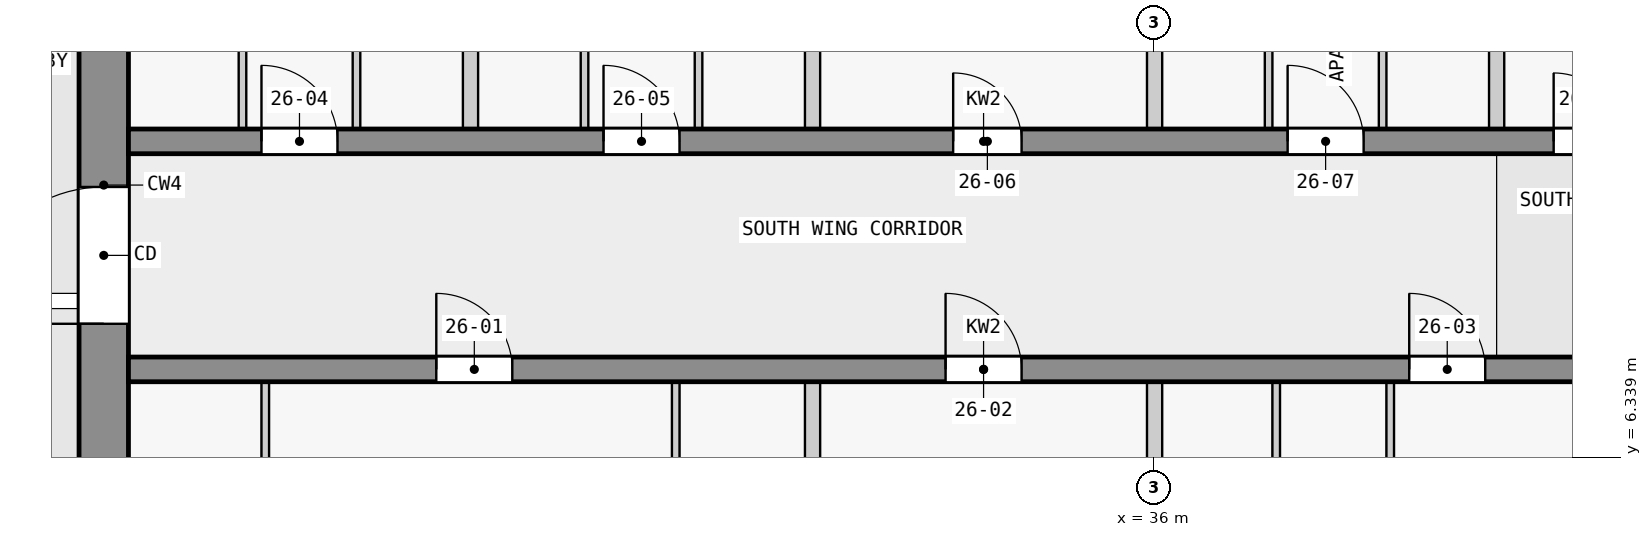
"""IFC4 building model, lengths in metres.
Left out: names, types, materials, properties, quantities, classifications, styles, units other than length and angle.
Written with IfcOpenShell. Run it as: python <this file> out.ifc"""

import sys

from ifc_helpers import new_model, si_unit, direction, frame, frame_2d, origin, place, context, subcontext, project, spatial, rectangle, extrude, element, fill, save


model = new_model("IFC4")
c1 = context("Model", 3, precision=1e-05, world=origin(), true_north=direction((0.0, 1.0)))
c2 = subcontext(c1, "Body", "Model", "MODEL_VIEW")
j1 = project(units=[si_unit("LENGTHUNIT", "METRE"), si_unit("PLANEANGLEUNIT", "RADIAN")], contexts=[c1])
p1 = place(None, origin())
s1 = spatial("IfcSite", under=j1, at=p1, CompositionType="ELEMENT")
p2 = place(p1, origin())
s2 = spatial("IfcBuilding", under=s1, at=p2, CompositionType="ELEMENT")
p3 = place(p2, frame((0.0, 0.0, 102.8)))
s3 = spatial("IfcBuildingStorey", under=s2, at=p3, CompositionType="ELEMENT", Elevation=102.8)
p4 = place(p3, frame((22.175, 2.5, 0.0), z_axis=(0.0, 0.0, 1.0), x_axis=(0.0, 1.0, 0.0)))
e1 = element("IfcWall", 1, at=p4, inside=s3, PredefinedType="SHEAR", context=c2, shape_type="SweptSolid", body=[
    extrude(rectangle(XDim=14.85, YDim=0.65, at=frame_2d((7.425, 0.0))), origin(), (0.0, 0.0, 1.0), 3.25),
])
p5 = place(p4, frame((5.6, 0.0, 0.0)))
e2 = element("IfcOpeningElement", 2, at=p5, cuts=e1, PredefinedType="OPENING", context=c2, shape_type="SweptSolid", body=[
    extrude(rectangle(XDim=1.8, YDim=2.1, at=frame_2d((0.9, 1.05))), frame((0.0, 0.335, 0.0), z_axis=(0.0, -1.0, 0.0), x_axis=(1.0, 0.0, 0.0)), (0.0, 0.0, 1.0), 0.67),
])
p6 = place(p3, frame((22.5, 7.5, 0.0), z_axis=(0.0, 0.0, 1.0), x_axis=(1.0, 0.0, 0.0)))
e3 = element("IfcWall", 3, at=p6, inside=s3, PredefinedType="SHEAR", context=c2, shape_type="SweptSolid", body=[
    extrude(rectangle(XDim=22.5, YDim=0.325, at=frame_2d((11.25, 0.0))), origin(), (0.0, 0.0, 1.0), 3.25),
])
p7 = place(p6, frame((4.05, 0.0, 0.0)))
e4 = element("IfcOpeningElement", 4, at=p7, cuts=e3, PredefinedType="OPENING", context=c2, shape_type="SweptSolid", body=[
    extrude(rectangle(XDim=1.0, YDim=2.1, at=frame_2d((0.5, 1.05))), frame((0.0, 0.172, 0.0), z_axis=(0.0, -1.0, 0.0), x_axis=(1.0, 0.0, 0.0)), (0.0, 0.0, 1.0), 0.345),
])
p8 = place(p6, frame((10.75, 0.0, 0.0)))
e5 = element("IfcOpeningElement", 5, at=p8, cuts=e3, PredefinedType="OPENING", context=c2, shape_type="SweptSolid", body=[
    extrude(rectangle(XDim=1.0, YDim=2.1, at=frame_2d((0.5, 1.05))), frame((0.0, 0.172, 0.0), z_axis=(0.0, -1.0, 0.0), x_axis=(1.0, 0.0, 0.0)), (0.0, 0.0, 1.0), 0.345),
])
p9 = place(p6, frame((16.85, 0.0, 0.0)))
e6 = element("IfcOpeningElement", 6, at=p9, cuts=e3, PredefinedType="OPENING", context=c2, shape_type="SweptSolid", body=[
    extrude(rectangle(XDim=1.0, YDim=2.1, at=frame_2d((0.5, 1.05))), frame((0.0, 0.172, 0.0), z_axis=(0.0, -1.0, 0.0), x_axis=(1.0, 0.0, 0.0)), (0.0, 0.0, 1.0), 0.345),
])
p10 = place(p3, frame((22.5, 10.5, 0.0), z_axis=(0.0, 0.0, 1.0), x_axis=(1.0, 0.0, 0.0)))
e7 = element("IfcWall", 7, at=p10, inside=s3, PredefinedType="SHEAR", context=c2, shape_type="SweptSolid", body=[
    extrude(rectangle(XDim=22.5, YDim=0.325, at=frame_2d((11.25, 0.0))), origin(), (0.0, 0.0, 1.0), 3.25),
])
p11 = place(p10, frame((1.75, 0.0, 0.0)))
e8 = element("IfcOpeningElement", 8, at=p11, cuts=e7, PredefinedType="OPENING", context=c2, shape_type="SweptSolid", body=[
    extrude(rectangle(XDim=1.0, YDim=2.1, at=frame_2d((0.5, 1.05))), frame((0.0, 0.172, 0.0), z_axis=(0.0, -1.0, 0.0), x_axis=(1.0, 0.0, 0.0)), (0.0, 0.0, 1.0), 0.345),
])
p12 = place(p10, frame((6.25, 0.0, 0.0)))
e9 = element("IfcOpeningElement", 9, at=p12, cuts=e7, PredefinedType="OPENING", context=c2, shape_type="SweptSolid", body=[
    extrude(rectangle(XDim=1.0, YDim=2.1, at=frame_2d((0.5, 1.05))), frame((0.0, 0.172, 0.0), z_axis=(0.0, -1.0, 0.0), x_axis=(1.0, 0.0, 0.0)), (0.0, 0.0, 1.0), 0.345),
])
p13 = place(p10, frame((10.85, 0.0, 0.0)))
e10 = element("IfcOpeningElement", 10, at=p13, cuts=e7, PredefinedType="OPENING", context=c2, shape_type="SweptSolid", body=[
    extrude(rectangle(XDim=0.9, YDim=2.1, at=frame_2d((0.45, 1.05))), frame((0.0, 0.172, 0.0), z_axis=(0.0, -1.0, 0.0), x_axis=(1.0, 0.0, 0.0)), (0.0, 0.0, 1.0), 0.345),
])
p14 = place(p10, frame((15.25, 0.0, 0.0)))
e11 = element("IfcOpeningElement", 11, at=p14, cuts=e7, PredefinedType="OPENING", context=c2, shape_type="SweptSolid", body=[
    extrude(rectangle(XDim=1.0, YDim=2.1, at=frame_2d((0.5, 1.05))), frame((0.0, 0.172, 0.0), z_axis=(0.0, -1.0, 0.0), x_axis=(1.0, 0.0, 0.0)), (0.0, 0.0, 1.0), 0.345),
])
p15 = place(p10, frame((18.75, 0.0, 0.0)))
e12 = element("IfcOpeningElement", 12, at=p15, cuts=e7, PredefinedType="OPENING", context=c2, shape_type="SweptSolid", body=[
    extrude(rectangle(XDim=0.9, YDim=2.1, at=frame_2d((0.45, 1.05))), frame((0.0, 0.172, 0.0), z_axis=(0.0, -1.0, 0.0), x_axis=(1.0, 0.0, 0.0)), (0.0, 0.0, 1.0), 0.345),
])
p16 = place(p10, frame((20.95, 0.0, 0.0)))
e13 = element("IfcOpeningElement", 13, at=p16, cuts=e7, PredefinedType="OPENING", context=c2, shape_type="SweptSolid", body=[
    extrude(rectangle(XDim=1.0, YDim=2.1, at=frame_2d((0.5, 1.05))), frame((0.0, 0.172, 0.0), z_axis=(0.0, -1.0, 0.0), x_axis=(1.0, 0.0, 0.0)), (0.0, 0.0, 1.0), 0.345),
])
p17 = place(p3, frame((24.0, 10.663, 0.0), z_axis=(0.0, 0.0, 1.0), x_axis=(0.0, 1.0, 0.0)))
e14 = element("IfcWall", 14, at=p17, inside=s3, PredefinedType="PARTITIONING", context=c2, shape_type="SweptSolid", body=[
    extrude(rectangle(XDim=3.4, YDim=0.1, at=frame_2d((1.7, 0.0))), origin(), (0.0, 0.0, 1.0), 3.25),
])
p18 = place(p17, frame((1.25, 0.0, 0.0)))
e15 = element("IfcOpeningElement", 15, at=p18, cuts=e14, PredefinedType="OPENING", context=c2, shape_type="SweptSolid", body=[
    extrude(rectangle(XDim=0.9, YDim=2.1, at=frame_2d((0.45, 1.05))), frame((0.0, 0.06, 0.0), z_axis=(0.0, -1.0, 0.0), x_axis=(1.0, 0.0, 0.0)), (0.0, 0.0, 1.0), 0.12),
])
p19 = place(p3, frame((24.3, 3.938, 0.0), z_axis=(0.0, 0.0, 1.0), x_axis=(0.0, 1.0, 0.0)))
e16 = element("IfcWall", 16, at=p19, inside=s3, PredefinedType="PARTITIONING", context=c2, shape_type="SweptSolid", body=[
    extrude(rectangle(XDim=3.4, YDim=0.1, at=frame_2d((1.7, 0.0))), origin(), (0.0, 0.0, 1.0), 3.25),
])
p20 = place(p19, frame((1.25, 0.0, 0.0)))
e17 = element("IfcOpeningElement", 17, at=p20, cuts=e16, PredefinedType="OPENING", context=c2, shape_type="SweptSolid", body=[
    extrude(rectangle(XDim=0.9, YDim=2.1, at=frame_2d((0.45, 1.05))), frame((0.0, 0.06, 0.0), z_axis=(0.0, -1.0, 0.0), x_axis=(1.0, 0.0, 0.0)), (0.0, 0.0, 1.0), 0.12),
])
p21 = place(p3, frame((25.5, 14.062, 0.0), z_axis=(0.0, 0.0, 1.0), x_axis=(0.0, -1.0, 0.0)))
e18 = element("IfcWall", 18, at=p21, inside=s3, PredefinedType="PARTITIONING", context=c2, shape_type="SweptSolid", body=[
    extrude(rectangle(XDim=3.4, YDim=0.1, at=frame_2d((1.7, 0.0))), origin(), (0.0, 0.0, 1.0), 3.25),
])
p22 = place(p21, frame((1.25, 0.0, 0.0)))
e19 = element("IfcOpeningElement", 19, at=p22, cuts=e18, PredefinedType="OPENING", context=c2, shape_type="SweptSolid", body=[
    extrude(rectangle(XDim=0.9, YDim=2.1, at=frame_2d((0.45, 1.05))), frame((0.0, 0.06, 0.0), z_axis=(0.0, -1.0, 0.0), x_axis=(1.0, 0.0, 0.0)), (0.0, 0.0, 1.0), 0.12),
])
p23 = place(p3, frame((27.0, 10.663, 0.0), z_axis=(0.0, 0.0, 1.0), x_axis=(0.0, 1.0, 0.0)))
e20 = element("IfcWall", 20, at=p23, inside=s3, PredefinedType="PARTITIONING", context=c2, shape_type="SweptSolid", body=[
    extrude(rectangle(XDim=3.4, YDim=0.2, at=frame_2d((1.7, 0.0))), origin(), (0.0, 0.0, 1.0), 3.25),
])
p24 = place(p3, frame((28.5, 10.663, 0.0), z_axis=(0.0, 0.0, 1.0), x_axis=(0.0, 1.0, 0.0)))
e21 = element("IfcWall", 21, at=p24, inside=s3, PredefinedType="PARTITIONING", context=c2, shape_type="SweptSolid", body=[
    extrude(rectangle(XDim=3.4, YDim=0.1, at=frame_2d((1.7, 0.0))), origin(), (0.0, 0.0, 1.0), 3.25),
])
p25 = place(p24, frame((1.25, 0.0, 0.0)))
e22 = element("IfcOpeningElement", 22, at=p25, cuts=e21, PredefinedType="OPENING", context=c2, shape_type="SweptSolid", body=[
    extrude(rectangle(XDim=0.9, YDim=2.1, at=frame_2d((0.45, 1.05))), frame((0.0, 0.06, 0.0), z_axis=(0.0, -1.0, 0.0), x_axis=(1.0, 0.0, 0.0)), (0.0, 0.0, 1.0), 0.12),
])
p26 = place(p3, frame((29.7, 7.337, 0.0), z_axis=(0.0, 0.0, 1.0), x_axis=(0.0, -1.0, 0.0)))
e23 = element("IfcWall", 23, at=p26, inside=s3, PredefinedType="PARTITIONING", context=c2, shape_type="SweptSolid", body=[
    extrude(rectangle(XDim=3.4, YDim=0.1, at=frame_2d((1.7, 0.0))), origin(), (0.0, 0.0, 1.0), 3.25),
])
p27 = place(p26, frame((1.25, 0.0, 0.0)))
e24 = element("IfcOpeningElement", 24, at=p27, cuts=e23, PredefinedType="OPENING", context=c2, shape_type="SweptSolid", body=[
    extrude(rectangle(XDim=0.9, YDim=2.1, at=frame_2d((0.45, 1.05))), frame((0.0, 0.06, 0.0), z_axis=(0.0, -1.0, 0.0), x_axis=(1.0, 0.0, 0.0)), (0.0, 0.0, 1.0), 0.12),
])
p28 = place(p3, frame((30.0, 14.062, 0.0), z_axis=(0.0, 0.0, 1.0), x_axis=(0.0, -1.0, 0.0)))
e25 = element("IfcWall", 25, at=p28, inside=s3, PredefinedType="PARTITIONING", context=c2, shape_type="SweptSolid", body=[
    extrude(rectangle(XDim=3.4, YDim=0.1, at=frame_2d((1.7, 0.0))), origin(), (0.0, 0.0, 1.0), 3.25),
])
p29 = place(p28, frame((1.25, 0.0, 0.0)))
e26 = element("IfcOpeningElement", 26, at=p29, cuts=e25, PredefinedType="OPENING", context=c2, shape_type="SweptSolid", body=[
    extrude(rectangle(XDim=0.9, YDim=2.1, at=frame_2d((0.45, 1.05))), frame((0.0, 0.06, 0.0), z_axis=(0.0, -1.0, 0.0), x_axis=(1.0, 0.0, 0.0)), (0.0, 0.0, 1.0), 0.12),
])
p30 = place(p3, frame((31.5, 1.122, 0.0), z_axis=(0.0, 0.0, 1.0), x_axis=(0.0, 1.0, 0.0)))
e27 = element("IfcWall", 27, at=p30, inside=s3, PredefinedType="PARTITIONING", context=c2, shape_type="SweptSolid", body=[
    extrude(rectangle(XDim=6.215, YDim=0.2, at=frame_2d((3.107, 0.0))), origin(), (0.0, 0.0, 1.0), 3.25),
])
p31 = place(p3, frame((31.5, 10.663, 0.0), z_axis=(0.0, 0.0, 1.0), x_axis=(0.0, 1.0, 0.0)))
e28 = element("IfcWall", 28, at=p31, inside=s3, PredefinedType="PARTITIONING", context=c2, shape_type="SweptSolid", body=[
    extrude(rectangle(XDim=3.4, YDim=0.2, at=frame_2d((1.7, 0.0))), origin(), (0.0, 0.0, 1.0), 3.25),
])
for number, where, z_axis, x_axis in (
    (29, (36.0, 1.4, 0.0), (0.0, 0.0, 1.0), (0.0, 1.0, 0.0)),
    (30, (36.0, 10.663, 0.0), (0.0, 0.0, 1.0), (0.0, 1.0, 0.0)),
):
    element("IfcWall", number, at=place(p3, frame(where, z_axis=z_axis, x_axis=x_axis)), inside=s3, PredefinedType="PARTITIONING", context=c2, shape_type="SweptSolid", body=[
        extrude(rectangle(XDim=5.938, YDim=0.2, at=frame_2d((2.969, 0.0))), origin(), (0.0, 0.0, 1.0), 3.25),
    ])
p32 = place(p3, frame((37.5, 10.663, 0.0), z_axis=(0.0, 0.0, 1.0), x_axis=(0.0, 1.0, 0.0)))
e31 = element("IfcWall", 31, at=p32, inside=s3, PredefinedType="PARTITIONING", context=c2, shape_type="SweptSolid", body=[
    extrude(rectangle(XDim=3.4, YDim=0.1, at=frame_2d((1.7, 0.0))), origin(), (0.0, 0.0, 1.0), 3.25),
])
p33 = place(p32, frame((1.25, 0.0, 0.0)))
e32 = element("IfcOpeningElement", 32, at=p33, cuts=e31, PredefinedType="OPENING", context=c2, shape_type="SweptSolid", body=[
    extrude(rectangle(XDim=0.9, YDim=2.1, at=frame_2d((0.45, 1.05))), frame((0.0, 0.06, 0.0), z_axis=(0.0, -1.0, 0.0), x_axis=(1.0, 0.0, 0.0)), (0.0, 0.0, 1.0), 0.12),
])
p34 = place(p3, frame((37.6, 3.938, 0.0), z_axis=(0.0, 0.0, 1.0), x_axis=(0.0, 1.0, 0.0)))
e33 = element("IfcWall", 33, at=p34, inside=s3, PredefinedType="PARTITIONING", context=c2, shape_type="SweptSolid", body=[
    extrude(rectangle(XDim=3.4, YDim=0.1, at=frame_2d((1.7, 0.0))), origin(), (0.0, 0.0, 1.0), 3.25),
])
p35 = place(p3, frame((39.0, 14.062, 0.0), z_axis=(0.0, 0.0, 1.0), x_axis=(0.0, -1.0, 0.0)))
e34 = element("IfcWall", 34, at=p35, inside=s3, PredefinedType="PARTITIONING", context=c2, shape_type="SweptSolid", body=[
    extrude(rectangle(XDim=3.4, YDim=0.1, at=frame_2d((1.7, 0.0))), origin(), (0.0, 0.0, 1.0), 3.25),
])
p36 = place(p35, frame((1.25, 0.0, 0.0)))
e35 = element("IfcOpeningElement", 35, at=p36, cuts=e34, PredefinedType="OPENING", context=c2, shape_type="SweptSolid", body=[
    extrude(rectangle(XDim=0.9, YDim=2.1, at=frame_2d((0.45, 1.05))), frame((0.0, 0.06, 0.0), z_axis=(0.0, -1.0, 0.0), x_axis=(1.0, 0.0, 0.0)), (0.0, 0.0, 1.0), 0.12),
])
p37 = place(p3, frame((39.1, 3.938, 0.0), z_axis=(0.0, 0.0, 1.0), x_axis=(0.0, 1.0, 0.0)))
e36 = element("IfcWall", 36, at=p37, inside=s3, PredefinedType="PARTITIONING", context=c2, shape_type="SweptSolid", body=[
    extrude(rectangle(XDim=3.4, YDim=0.1, at=frame_2d((1.7, 0.0))), origin(), (0.0, 0.0, 1.0), 3.25),
])
p38 = place(p37, frame((1.25, 0.0, 0.0)))
e37 = element("IfcOpeningElement", 37, at=p38, cuts=e36, PredefinedType="OPENING", context=c2, shape_type="SweptSolid", body=[
    extrude(rectangle(XDim=0.9, YDim=2.1, at=frame_2d((0.45, 1.05))), frame((0.0, 0.06, 0.0), z_axis=(0.0, -1.0, 0.0), x_axis=(1.0, 0.0, 0.0)), (0.0, 0.0, 1.0), 0.12),
])
p39 = place(p3, frame((40.5, 10.663, 0.0), z_axis=(0.0, 0.0, 1.0), x_axis=(0.0, 1.0, 0.0)))
e38 = element("IfcWall", 38, at=p39, inside=s3, PredefinedType="PARTITIONING", context=c2, shape_type="SweptSolid", body=[
    extrude(rectangle(XDim=3.4, YDim=0.2, at=frame_2d((1.7, 0.0))), origin(), (0.0, 0.0, 1.0), 3.25),
])
p40 = place(p5, origin())
e39 = element("IfcDoor", 39, at=p40, inside=s3, OperationType="DOUBLE_DOOR_SINGLE_SWING", PredefinedType="DOOR", context=c2, shape_type="SweptSolid", body=[
    extrude(rectangle(XDim=1.8, YDim=2.1, at=frame_2d((0.9, 1.05))), frame((0.0, 0.025, 0.0), z_axis=(0.0, -1.0, 0.0), x_axis=(1.0, 0.0, 0.0)), (0.0, 0.0, 1.0), 0.05),
])
fill(e2, e39)
p41 = place(p7, origin())
e40 = element("IfcDoor", 40, at=p41, inside=s3, OperationType="SINGLE_SWING_LEFT", PredefinedType="DOOR", context=c2, shape_type="SweptSolid", body=[
    extrude(rectangle(XDim=1.0, YDim=2.1, at=frame_2d((0.5, 1.05))), frame((0.0, 0.025, 0.0), z_axis=(0.0, -1.0, 0.0), x_axis=(1.0, 0.0, 0.0)), (0.0, 0.0, 1.0), 0.05),
])
fill(e4, e40)
p42 = place(p8, origin())
e41 = element("IfcDoor", 41, at=p42, inside=s3, OperationType="SINGLE_SWING_LEFT", PredefinedType="DOOR", context=c2, shape_type="SweptSolid", body=[
    extrude(rectangle(XDim=1.0, YDim=2.1, at=frame_2d((0.5, 1.05))), frame((0.0, 0.025, 0.0), z_axis=(0.0, -1.0, 0.0), x_axis=(1.0, 0.0, 0.0)), (0.0, 0.0, 1.0), 0.05),
])
fill(e5, e41)
p43 = place(p9, origin())
e42 = element("IfcDoor", 42, at=p43, inside=s3, OperationType="SINGLE_SWING_RIGHT", PredefinedType="DOOR", context=c2, shape_type="SweptSolid", body=[
    extrude(rectangle(XDim=1.0, YDim=2.1, at=frame_2d((0.5, 1.05))), frame((0.0, 0.025, 0.0), z_axis=(0.0, -1.0, 0.0), x_axis=(1.0, 0.0, 0.0)), (0.0, 0.0, 1.0), 0.05),
])
fill(e6, e42)
p44 = place(p11, origin())
e43 = element("IfcDoor", 43, at=p44, inside=s3, OperationType="SINGLE_SWING_LEFT", PredefinedType="DOOR", context=c2, shape_type="SweptSolid", body=[
    extrude(rectangle(XDim=1.0, YDim=2.1, at=frame_2d((0.5, 1.05))), frame((0.0, 0.025, 0.0), z_axis=(0.0, -1.0, 0.0), x_axis=(1.0, 0.0, 0.0)), (0.0, 0.0, 1.0), 0.05),
])
fill(e8, e43)
p45 = place(p12, origin())
e44 = element("IfcDoor", 44, at=p45, inside=s3, OperationType="SINGLE_SWING_LEFT", PredefinedType="DOOR", context=c2, shape_type="SweptSolid", body=[
    extrude(rectangle(XDim=1.0, YDim=2.1, at=frame_2d((0.5, 1.05))), frame((0.0, 0.025, 0.0), z_axis=(0.0, -1.0, 0.0), x_axis=(1.0, 0.0, 0.0)), (0.0, 0.0, 1.0), 0.05),
])
fill(e9, e44)
p46 = place(p13, origin())
e45 = element("IfcDoor", 45, at=p46, inside=s3, OperationType="SINGLE_SWING_RIGHT", PredefinedType="DOOR", context=c2, shape_type="SweptSolid", body=[
    extrude(rectangle(XDim=0.9, YDim=2.1, at=frame_2d((0.45, 1.05))), frame((0.0, 0.025, 0.0), z_axis=(0.0, -1.0, 0.0), x_axis=(1.0, 0.0, 0.0)), (0.0, 0.0, 1.0), 0.05),
])
fill(e10, e45)
p47 = place(p14, origin())
e46 = element("IfcDoor", 46, at=p47, inside=s3, OperationType="SINGLE_SWING_RIGHT", PredefinedType="DOOR", context=c2, shape_type="SweptSolid", body=[
    extrude(rectangle(XDim=1.0, YDim=2.1, at=frame_2d((0.5, 1.05))), frame((0.0, 0.025, 0.0), z_axis=(0.0, -1.0, 0.0), x_axis=(1.0, 0.0, 0.0)), (0.0, 0.0, 1.0), 0.05),
])
fill(e11, e46)
p48 = place(p15, origin())
e47 = element("IfcDoor", 47, at=p48, inside=s3, OperationType="SINGLE_SWING_RIGHT", PredefinedType="DOOR", context=c2, shape_type="SweptSolid", body=[
    extrude(rectangle(XDim=0.9, YDim=2.1, at=frame_2d((0.45, 1.05))), frame((0.0, 0.025, 0.0), z_axis=(0.0, -1.0, 0.0), x_axis=(1.0, 0.0, 0.0)), (0.0, 0.0, 1.0), 0.05),
])
fill(e12, e47)
save(model, sys.argv[1])
